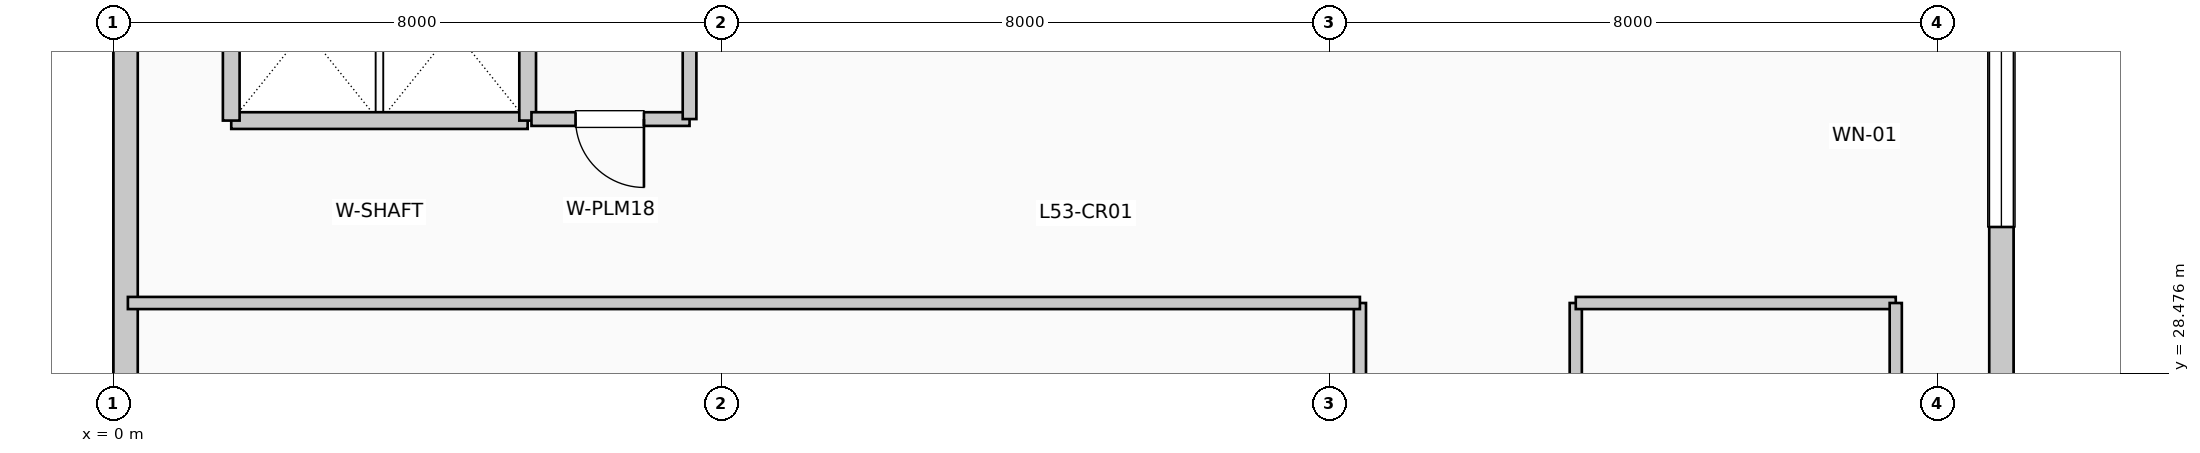
"""IFC4 building model, lengths in metres.
Left out: names, types, materials, properties, quantities, classifications, styles, units other than length and angle.
Written with IfcOpenShell. Run it as: python <this file> out.ifc"""

import sys

from ifc_helpers import new_model, si_unit, direction, frame, frame_2d, origin, place, context, subcontext, project, spatial, rectangle, extrude, element, fill, save


model = new_model("IFC4")
c1 = context("Model", 3, precision=1e-05, world=origin(), true_north=direction((0.0, 1.0)))
c2 = subcontext(c1, "Body", "Model", "MODEL_VIEW")
j1 = project(units=[si_unit("LENGTHUNIT", "METRE"), si_unit("PLANEANGLEUNIT", "RADIAN")], contexts=[c1])
p1 = place(None, origin())
s1 = spatial("IfcSite", under=j1, at=p1, CompositionType="ELEMENT")
p2 = place(p1, origin())
s2 = spatial("IfcBuilding", under=s1, at=p2, CompositionType="ELEMENT")
p3 = place(p2, frame((0.0, 0.0, 219.78)))
s3 = spatial("IfcBuildingStorey", under=s2, at=p3, CompositionType="ELEMENT", Elevation=219.78)
p4 = place(p3, frame((24.84, 22.055, 0.0), z_axis=(0.0, 0.0, 1.0), x_axis=(0.0, 1.0, 0.0)))
e1 = element("IfcWall", 1, at=p4, inside=s3, PredefinedType="SOLIDWALL", context=c2, shape_type="SweptSolid", body=[
    extrude(rectangle(XDim=19.09, YDim=0.32, at=frame_2d((9.545, 0.0))), origin(), (0.0, 0.0, 1.0), 3.71),
])
p5 = place(p4, frame((8.345, 0.0, 0.85)))
e2 = element("IfcOpeningElement", 2, at=p5, cuts=e1, PredefinedType="OPENING", context=c2, shape_type="SweptSolid", body=[
    extrude(rectangle(XDim=2.4, YDim=2.05, at=frame_2d((1.2, 1.025))), frame((0.0, 0.17, 0.0), z_axis=(0.0, -1.0, 0.0), x_axis=(1.0, 0.0, 0.0)), (0.0, 0.0, 1.0), 0.34),
])
p6 = place(p3, frame((0.16, 34.395, 0.0), z_axis=(0.0, 0.0, 1.0), x_axis=(0.0, -1.0, 0.0)))
e3 = element("IfcWall", 3, at=p6, inside=s3, PredefinedType="SOLIDWALL", context=c2, shape_type="SweptSolid", body=[
    extrude(rectangle(XDim=25.54, YDim=0.32, at=frame_2d((12.77, 0.0))), origin(), (0.0, 0.0, 1.0), 3.71),
])
p7 = place(p3, frame((1.55, 31.8, 0.0), z_axis=(0.0, 0.0, 1.0), x_axis=(1.0, 0.0, 0.0)))
e4 = element("IfcWall", 4, at=p7, inside=s3, PredefinedType="PARTITIONING", context=c2, shape_type="SweptSolid", body=[
    extrude(rectangle(XDim=3.9, YDim=0.22, at=frame_2d((1.95, 0.0))), origin(), (0.0, 0.0, 1.0), 3.71),
])
for number, where, z_axis, x_axis in (
    (5, (1.55, 31.8, 0.0), (0.0, 0.0, 1.0), (0.0, 1.0, 0.0)),
    (6, (5.45, 31.8, 0.0), (0.0, 0.0, 1.0), (0.0, 1.0, 0.0)),
):
    element("IfcWall", number, at=place(p3, frame(where, z_axis=z_axis, x_axis=x_axis)), inside=s3, PredefinedType="PARTITIONING", context=c2, shape_type="SweptSolid", body=[
        extrude(rectangle(XDim=2.38, YDim=0.22, at=frame_2d((1.19, 0.0))), origin(), (0.0, 0.0, 1.0), 3.71),
    ])
p8 = place(p3, frame((5.5, 31.82, 0.0), z_axis=(0.0, 0.0, 1.0), x_axis=(1.0, 0.0, 0.0)))
e7 = element("IfcWall", 7, at=p8, inside=s3, PredefinedType="PLUMBINGWALL", context=c2, shape_type="SweptSolid", body=[
    extrude(rectangle(XDim=2.08, YDim=0.18, at=frame_2d((1.04, 0.0))), origin(), (0.0, 0.0, 1.0), 3.71),
])
p9 = place(p8, frame((1.48, 0.0, 0.0), z_axis=(0.0, 0.0, 1.0), x_axis=(-1.0, 0.0, 0.0)))
e8 = element("IfcOpeningElement", 8, at=p9, cuts=e7, PredefinedType="OPENING", context=c2, shape_type="SweptSolid", body=[
    extrude(rectangle(XDim=0.9, YDim=2.1, at=frame_2d((0.45, 1.05))), frame((0.0, 0.1, 0.0), z_axis=(0.0, -1.0, 0.0), x_axis=(1.0, 0.0, 0.0)), (0.0, 0.0, 1.0), 0.2),
])
p10 = place(p3, frame((7.58, 31.82, 0.0), z_axis=(0.0, 0.0, 1.0), x_axis=(0.0, 1.0, 0.0)))
e9 = element("IfcWall", 9, at=p10, inside=s3, PredefinedType="PLUMBINGWALL", context=c2, shape_type="SweptSolid", body=[
    extrude(rectangle(XDim=2.36, YDim=0.18, at=frame_2d((1.18, 0.0))), origin(), (0.0, 0.0, 1.0), 3.71),
])
p11 = place(p3, frame((16.4, 12.0, 0.0), z_axis=(0.0, 0.0, 1.0), x_axis=(0.0, 1.0, 0.0)))
e10 = element("IfcWall", 10, at=p11, inside=s3, PredefinedType="PARTITIONING", context=c2, shape_type="SweptSolid", body=[
    extrude(rectangle(XDim=17.4, YDim=0.16, at=frame_2d((8.7, 0.0))), origin(), (0.0, 0.0, 1.0), 3.71),
])
p12 = place(p11, frame((3.433, 0.0, 0.0), z_axis=(0.0, 0.0, 1.0), x_axis=(-1.0, 0.0, 0.0)))
e11 = element("IfcOpeningElement", 11, at=p12, cuts=e10, PredefinedType="OPENING", context=c2, shape_type="SweptSolid", body=[
    extrude(rectangle(XDim=0.95, YDim=2.15, at=frame_2d((0.475, 1.075))), frame((0.0, 0.09, 0.0), z_axis=(0.0, -1.0, 0.0), x_axis=(1.0, 0.0, 0.0)), (0.0, 0.0, 1.0), 0.18),
])
p13 = place(p11, frame((9.349, 0.0, 0.0), z_axis=(0.0, 0.0, 1.0), x_axis=(-1.0, 0.0, 0.0)))
e12 = element("IfcOpeningElement", 12, at=p13, cuts=e10, PredefinedType="OPENING", context=c2, shape_type="SweptSolid", body=[
    extrude(rectangle(XDim=0.95, YDim=2.15, at=frame_2d((0.475, 1.075))), frame((0.0, 0.09, 0.0), z_axis=(0.0, -1.0, 0.0), x_axis=(1.0, 0.0, 0.0)), (0.0, 0.0, 1.0), 0.18),
])
p14 = place(p11, frame((15.091, 0.0, 0.0), z_axis=(0.0, 0.0, 1.0), x_axis=(-1.0, 0.0, 0.0)))
e13 = element("IfcOpeningElement", 13, at=p14, cuts=e10, PredefinedType="OPENING", context=c2, shape_type="SweptSolid", body=[
    extrude(rectangle(XDim=0.95, YDim=2.15, at=frame_2d((0.475, 1.075))), frame((0.0, 0.09, 0.0), z_axis=(0.0, -1.0, 0.0), x_axis=(1.0, 0.0, 0.0)), (0.0, 0.0, 1.0), 0.18),
])
p15 = place(p3, frame((19.24, 12.0, 0.0), z_axis=(0.0, 0.0, 1.0), x_axis=(0.0, 1.0, 0.0)))
e14 = element("IfcWall", 14, at=p15, inside=s3, PredefinedType="PARTITIONING", context=c2, shape_type="SweptSolid", body=[
    extrude(rectangle(XDim=17.4, YDim=0.16, at=frame_2d((8.7, 0.0))), origin(), (0.0, 0.0, 1.0), 3.71),
])
p16 = place(p15, frame((8.225, 0.0, 0.0)))
e15 = element("IfcOpeningElement", 15, at=p16, cuts=e14, PredefinedType="OPENING", context=c2, shape_type="SweptSolid", body=[
    extrude(rectangle(XDim=0.95, YDim=2.15, at=frame_2d((0.475, 1.075))), frame((0.0, 0.09, 0.0), z_axis=(0.0, -1.0, 0.0), x_axis=(1.0, 0.0, 0.0)), (0.0, 0.0, 1.0), 0.18),
])
p17 = place(p3, frame((0.19, 29.4, 0.0), z_axis=(0.0, 0.0, 1.0), x_axis=(1.0, 0.0, 0.0)))
e16 = element("IfcWall", 16, at=p17, inside=s3, PredefinedType="PARTITIONING", context=c2, shape_type="SweptSolid", body=[
    extrude(rectangle(XDim=16.21, YDim=0.16, at=frame_2d((8.105, 0.0))), origin(), (0.0, 0.0, 1.0), 3.365),
])
p18 = place(p3, frame((19.24, 29.4, 0.0), z_axis=(0.0, 0.0, 1.0), x_axis=(1.0, 0.0, 0.0)))
e17 = element("IfcWall", 17, at=p18, inside=s3, PredefinedType="PARTITIONING", context=c2, shape_type="SweptSolid", body=[
    extrude(rectangle(XDim=4.21, YDim=0.16, at=frame_2d((2.105, 0.0))), origin(), (0.0, 0.0, 1.0), 3.365),
])
p19 = place(p3, frame((23.45, 5.99, 0.0), z_axis=(0.0, 0.0, 1.0), x_axis=(0.0, 1.0, 0.0)))
e18 = element("IfcWall", 18, at=p19, inside=s3, PredefinedType="PARTITIONING", context=c2, shape_type="SweptSolid", body=[
    extrude(rectangle(XDim=23.41, YDim=0.16, at=frame_2d((11.705, 0.0))), origin(), (0.0, 0.0, 1.0), 3.095),
])
p20 = place(p5, origin())
e19 = element("IfcWindow", 19, at=p20, inside=s3, PartitioningType="SINGLE_PANEL", PredefinedType="WINDOW", context=c2, shape_type="SweptSolid", body=[
    extrude(rectangle(XDim=2.4, YDim=2.05, at=frame_2d((1.2, 1.025))), frame((0.0, 0.03, 0.0), z_axis=(0.0, -1.0, 0.0), x_axis=(1.0, 0.0, 0.0)), (0.0, 0.0, 1.0), 0.06),
])
fill(e2, e19)
p21 = place(p9, origin())
e20 = element("IfcDoor", 20, at=p21, inside=s3, OperationType="SINGLE_SWING_RIGHT", PredefinedType="DOOR", context=c2, shape_type="SweptSolid", body=[
    extrude(rectangle(XDim=0.9, YDim=2.1, at=frame_2d((0.45, 1.05))), frame((0.0, 0.025, 0.0), z_axis=(0.0, -1.0, 0.0), x_axis=(1.0, 0.0, 0.0)), (0.0, 0.0, 1.0), 0.05),
])
fill(e8, e20)
save(model, sys.argv[1])
